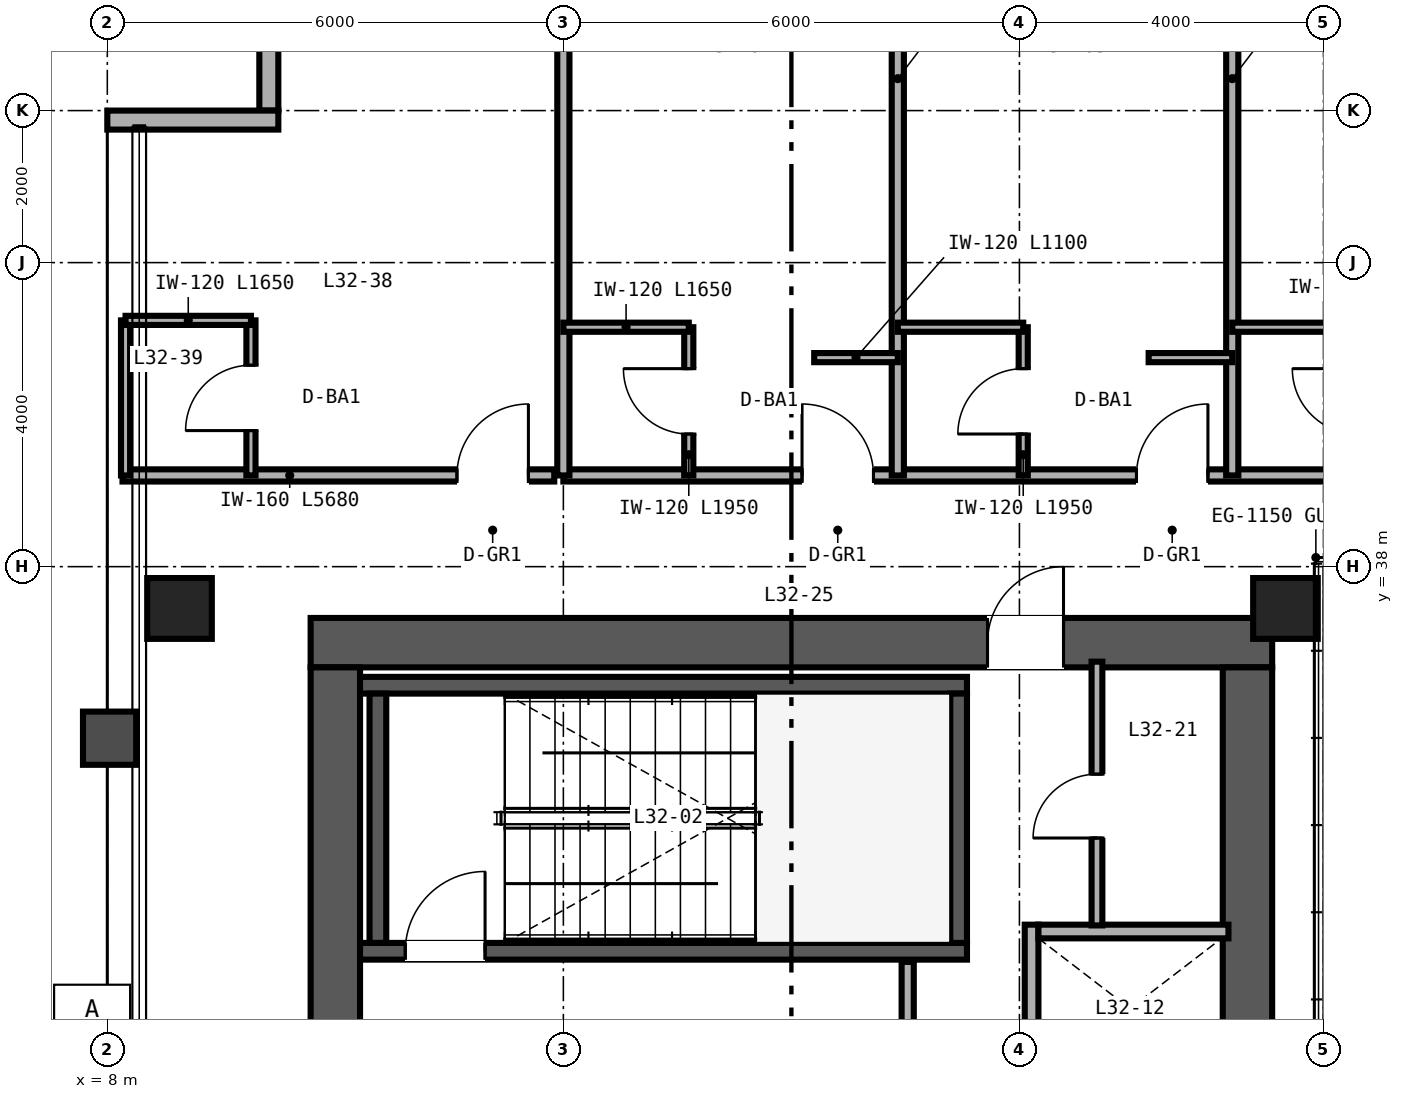
"""IFC4 building model, lengths in metres.
Left out: names, types, materials, properties, quantities, classifications, styles, units other than length and angle.
Written with IfcOpenShell. Run it as: python <this file> out.ifc"""

import sys

from ifc_helpers import new_model, si_unit, direction, frame, frame_2d, origin, origin_2d, place, context, subcontext, project, spatial, rectangle, hollow_rectangle, extrude, source, transform, mapped, element, fill, save


model = new_model("IFC4")
c1 = context("Model", 3, precision=1e-05, world=origin(), true_north=direction((0.0, 1.0)))
c2 = subcontext(c1, "Body", "Model", "MODEL_VIEW")
j1 = project(units=[si_unit("LENGTHUNIT", "METRE"), si_unit("PLANEANGLEUNIT", "RADIAN")], contexts=[c1])
p1 = place(None, origin())
s1 = spatial("IfcSite", under=j1, at=p1, CompositionType="ELEMENT")
p2 = place(p1, origin())
s2 = spatial("IfcBuilding", under=s1, at=p2, CompositionType="ELEMENT")
p3 = place(p2, frame((0.0, 0.0, 129.6)))
s3 = spatial("IfcBuildingStorey", under=s2, at=p3, CompositionType="ELEMENT", Elevation=129.6)
p4 = place(p3, frame((10.675, 37.0, 0.0), z_axis=(0.0, 0.0, 1.0), x_axis=(1.0, 0.0, 0.0)))
e1 = element("IfcWall", 1, at=p4, inside=s3, PredefinedType="SHEAR", context=c2, shape_type="SweptSolid", body=[
    extrude(rectangle(XDim=12.65, YDim=0.65, at=frame_2d((6.325, 0.0))), origin(), (0.0, 0.0, 1.0), 3.36),
])
p5 = place(p4, frame((8.905, 0.0, 0.0)))
e2 = element("IfcOpeningElement", 2, at=p5, cuts=e1, PredefinedType="OPENING", context=c2, shape_type="SweptSolid", body=[
    extrude(rectangle(XDim=1.0, YDim=2.15, at=frame_2d((0.5, 1.075))), frame((0.0, 0.335, 0.0), z_axis=(0.0, -1.0, 0.0), x_axis=(1.0, 0.0, 0.0)), (0.0, 0.0, 1.0), 0.67),
])
for number, where, z_axis, x_axis in (
    (3, (11.0, 15.325, 0.0), (0.0, 0.0, 1.0), (0.0, 1.0, 0.0)),
    (4, (23.0, 15.325, 0.0), (0.0, 0.0, 1.0), (0.0, 1.0, 0.0)),
):
    element("IfcWall", number, at=place(p3, frame(where, z_axis=z_axis, x_axis=x_axis)), inside=s3, PredefinedType="SHEAR", context=c2, shape_type="SweptSolid", body=[
        extrude(rectangle(XDim=21.35, YDim=0.65, at=frame_2d((10.675, 0.0))), origin(), (0.0, 0.0, 1.0), 3.36),
    ])
p6 = place(p3, frame((11.325, 32.94, 0.0), z_axis=(0.0, 0.0, 1.0), x_axis=(1.0, 0.0, 0.0)))
e5 = element("IfcWall", 5, at=p6, inside=s3, PredefinedType="SHEAR", context=c2, shape_type="SweptSolid", body=[
    extrude(rectangle(XDim=7.985, YDim=0.22, at=frame_2d((3.993, 0.0))), origin(), (0.0, 0.0, 1.0), 3.4),
])
p7 = place(p6, frame((0.595, 0.0, 0.0)))
e6 = element("IfcOpeningElement", 6, at=p7, cuts=e5, PredefinedType="OPENING", context=c2, shape_type="SweptSolid", body=[
    extrude(rectangle(XDim=1.05, YDim=2.15, at=frame_2d((0.525, 1.075))), frame((0.0, 0.12, 0.0), z_axis=(0.0, -1.0, 0.0), x_axis=(1.0, 0.0, 0.0)), (0.0, 0.0, 1.0), 0.24),
])
p8 = place(p3, frame((11.325, 36.44, 0.0), z_axis=(0.0, 0.0, 1.0), x_axis=(1.0, 0.0, 0.0)))
e7 = element("IfcWall", 7, at=p8, inside=s3, PredefinedType="SHEAR", context=c2, shape_type="SweptSolid", body=[
    extrude(rectangle(XDim=7.985, YDim=0.22, at=frame_2d((3.993, 0.0))), origin(), (0.0, 0.0, 1.0), 3.4),
])
for number, where, z_axis, x_axis in (
    (8, (11.56, 33.05, 0.0), (0.0, 0.0, 1.0), (0.0, 1.0, 0.0)),
    (9, (19.2, 33.05, 0.0), (0.0, 0.0, 1.0), (0.0, 1.0, 0.0)),
):
    element("IfcWall", number, at=place(p3, frame(where, z_axis=z_axis, x_axis=x_axis)), inside=s3, PredefinedType="SHEAR", context=c2, shape_type="SweptSolid", body=[
        extrude(rectangle(XDim=3.28, YDim=0.22, at=frame_2d((1.64, 0.0))), origin(), (0.0, 0.0, 1.0), 3.4),
    ])
m1 = source(origin(), c2, "Body", "SweptSolid", [
    extrude(hollow_rectangle(XDim=0.85, YDim=0.8, WallThickness=0.032, at=origin_2d()), origin(), (0.0, 0.0, 1.0), 3.36),
])
for number, where, z_axis, x_axis in (
    (10, (8.95, 37.45, 0.0), (0.0, 0.0, 1.0), (1.0, 0.0, 0.0)),
    (11, (23.5, 37.45, 0.0), (0.0, 0.0, 1.0), (1.0, 0.0, 0.0)),
):
    element("IfcColumn", number, at=place(p3, frame(where, z_axis=z_axis, x_axis=x_axis)), inside=s3, PredefinedType="COLUMN", context=c2, shape_type="MappedRepresentation", body=[
        mapped(m1, transform((0.0, 0.0, 0.0), scale=1.0)),
    ])
p9 = place(p3, frame((10.125, 46.0, 0.0), z_axis=(0.0, 0.0, 1.0), x_axis=(0.0, -1.0, 0.0)))
e12 = element("IfcWall", 12, at=p9, inside=s3, PredefinedType="SOLIDWALL", context=c2, shape_type="SweptSolid", body=[
    extrude(rectangle(XDim=2.0, YDim=0.25, at=frame_2d((1.0, 0.0))), origin(), (0.0, 0.0, 1.0), 3.36),
])
p10 = place(p3, frame((10.25, 43.875, 0.0), z_axis=(0.0, 0.0, 1.0), x_axis=(-1.0, 0.0, 0.0)))
e13 = element("IfcWall", 13, at=p10, inside=s3, PredefinedType="SOLIDWALL", context=c2, shape_type="SweptSolid", body=[
    extrude(rectangle(XDim=2.25, YDim=0.25, at=frame_2d((1.125, 0.0))), origin(), (0.0, 0.0, 1.0), 3.36),
])
p11 = place(p3, frame((20.16, 29.0, 0.0), z_axis=(0.0, 0.0, 1.0), x_axis=(0.0, 1.0, 0.0)))
e14 = element("IfcWall", 14, at=p11, inside=s3, PredefinedType="SOLIDWALL", context=c2, shape_type="SweptSolid", body=[
    extrude(rectangle(XDim=4.29, YDim=0.18, at=frame_2d((2.145, 0.0))), origin(), (0.0, 0.0, 1.0), 3.36),
])
p12 = place(p3, frame((20.25, 33.2, 0.0), z_axis=(0.0, 0.0, 1.0), x_axis=(1.0, 0.0, 0.0)))
e15 = element("IfcWall", 15, at=p12, inside=s3, PredefinedType="SOLIDWALL", context=c2, shape_type="SweptSolid", body=[
    extrude(rectangle(XDim=2.5, YDim=0.18, at=frame_2d((1.25, 0.0))), origin(), (0.0, 0.0, 1.0), 3.36),
])
p13 = place(p3, frame((18.53, 28.9, 0.0), z_axis=(0.0, 0.0, 1.0), x_axis=(0.0, 1.0, 0.0)))
e16 = element("IfcWall", 16, at=p13, inside=s3, PredefinedType="PARTITIONING", context=c2, shape_type="SweptSolid", body=[
    extrude(rectangle(XDim=3.9, YDim=0.16, at=frame_2d((1.95, 0.0))), origin(), (0.0, 0.0, 1.0), 3.36),
])
p14 = place(p13, frame((1.5, 0.0, 0.0)))
e17 = element("IfcOpeningElement", 17, at=p14, cuts=e16, PredefinedType="OPENING", context=c2, shape_type="SweptSolid", body=[
    extrude(rectangle(XDim=1.0, YDim=2.15, at=frame_2d((0.5, 1.075))), frame((0.0, 0.09, 0.0), z_axis=(0.0, -1.0, 0.0), x_axis=(1.0, 0.0, 0.0)), (0.0, 0.0, 1.0), 0.18),
])
p15 = place(p3, frame((21.02, 33.28, 0.0), z_axis=(0.0, 0.0, 1.0), x_axis=(0.0, 1.0, 0.0)))
e18 = element("IfcWall", 18, at=p15, inside=s3, PredefinedType="PARTITIONING", context=c2, shape_type="SweptSolid", body=[
    extrude(rectangle(XDim=3.47, YDim=0.142, at=frame_2d((1.735, 0.0))), origin(), (0.0, 0.0, 1.0), 3.36),
])
p16 = place(p15, frame((1.15, 0.0, 0.0)))
e19 = element("IfcOpeningElement", 19, at=p16, cuts=e18, PredefinedType="OPENING", context=c2, shape_type="SweptSolid", body=[
    extrude(rectangle(XDim=0.84, YDim=2.1, at=frame_2d((0.42, 1.05))), frame((0.0, 0.081, 0.0), z_axis=(0.0, -1.0, 0.0), x_axis=(1.0, 0.0, 0.0)), (0.0, 0.0, 1.0), 0.162),
])
p17 = place(p3, frame((8.2, 39.2, 0.0), z_axis=(0.0, 0.0, 1.0), x_axis=(1.0, 0.0, 0.0)))
e20 = element("IfcWall", 20, at=p17, inside=s3, PredefinedType="PARTITIONING", context=c2, shape_type="SweptSolid", body=[
    extrude(rectangle(XDim=5.68, YDim=0.16, at=frame_2d((2.84, 0.0))), origin(), (0.0, 0.0, 1.0), 3.36),
])
p18 = place(p17, frame((4.4, 0.0, 0.0)))
e21 = element("IfcOpeningElement", 21, at=p18, cuts=e20, PredefinedType="OPENING", context=c2, shape_type="SweptSolid", body=[
    extrude(rectangle(XDim=0.94, YDim=2.15, at=frame_2d((0.47, 1.075))), frame((0.0, 0.09, 0.0), z_axis=(0.0, -1.0, 0.0), x_axis=(1.0, 0.0, 0.0)), (0.0, 0.0, 1.0), 0.18),
])
p19 = place(p3, frame((9.89, 39.2, 0.0), z_axis=(0.0, 0.0, 1.0), x_axis=(0.0, 1.0, 0.0)))
e22 = element("IfcWall", 22, at=p19, inside=s3, PredefinedType="PARTITIONING", context=c2, shape_type="SweptSolid", body=[
    extrude(rectangle(XDim=2.04, YDim=0.12, at=frame_2d((1.02, 0.0))), origin(), (0.0, 0.0, 1.0), 3.36),
])
p20 = place(p19, frame((0.59, 0.0, 0.0)))
e23 = element("IfcOpeningElement", 23, at=p20, cuts=e22, PredefinedType="OPENING", context=c2, shape_type="SweptSolid", body=[
    extrude(rectangle(XDim=0.86, YDim=2.1, at=frame_2d((0.43, 1.05))), frame((0.0, 0.07, 0.0), z_axis=(0.0, -1.0, 0.0), x_axis=(1.0, 0.0, 0.0)), (0.0, 0.0, 1.0), 0.14),
])
p21 = place(p3, frame((8.24, 39.2, 0.0), z_axis=(0.0, 0.0, 1.0), x_axis=(0.0, 1.0, 0.0)))
e24 = element("IfcWall", 24, at=p21, inside=s3, PredefinedType="PARTITIONING", context=c2, shape_type="SweptSolid", body=[
    extrude(rectangle(XDim=2.04, YDim=0.12, at=frame_2d((1.02, 0.0))), origin(), (0.0, 0.0, 1.0), 3.36),
])
p22 = place(p3, frame((8.24, 41.24, 0.0), z_axis=(0.0, 0.0, 1.0), x_axis=(1.0, 0.0, 0.0)))
e25 = element("IfcWall", 25, at=p22, inside=s3, PredefinedType="PARTITIONING", context=c2, shape_type="SweptSolid", body=[
    extrude(rectangle(XDim=1.65, YDim=0.12, at=frame_2d((0.825, 0.0))), origin(), (0.0, 0.0, 1.0), 3.36),
])
p23 = place(p3, frame((14.0, 39.2, 0.0), z_axis=(0.0, 0.0, 1.0), x_axis=(1.0, 0.0, 0.0)))
e26 = element("IfcWall", 26, at=p23, inside=s3, PredefinedType="PARTITIONING", context=c2, shape_type="SweptSolid", body=[
    extrude(rectangle(XDim=36.0, YDim=0.16, at=frame_2d((18.0, 0.0))), origin(), (0.0, 0.0, 1.0), 2.581),
])
p24 = place(p23, frame((3.14, 0.0, 0.0)))
e27 = element("IfcOpeningElement", 27, at=p24, cuts=e26, PredefinedType="OPENING", context=c2, shape_type="SweptSolid", body=[
    extrude(rectangle(XDim=0.94, YDim=2.15, at=frame_2d((0.47, 1.075))), frame((0.0, 0.09, 0.0), z_axis=(0.0, -1.0, 0.0), x_axis=(1.0, 0.0, 0.0)), (0.0, 0.0, 1.0), 0.18),
])
p25 = place(p23, frame((7.54, 0.0, 0.0)))
e28 = element("IfcOpeningElement", 28, at=p25, cuts=e26, PredefinedType="OPENING", context=c2, shape_type="SweptSolid", body=[
    extrude(rectangle(XDim=0.94, YDim=2.15, at=frame_2d((0.47, 1.075))), frame((0.0, 0.09, 0.0), z_axis=(0.0, -1.0, 0.0), x_axis=(1.0, 0.0, 0.0)), (0.0, 0.0, 1.0), 0.18),
])
p26 = place(p23, frame((11.94, 0.0, 0.0)))
e29 = element("IfcOpeningElement", 29, at=p26, cuts=e26, PredefinedType="OPENING", context=c2, shape_type="SweptSolid", body=[
    extrude(rectangle(XDim=0.94, YDim=2.15, at=frame_2d((0.47, 1.075))), frame((0.0, 0.09, 0.0), z_axis=(0.0, -1.0, 0.0), x_axis=(1.0, 0.0, 0.0)), (0.0, 0.0, 1.0), 0.18),
])
p27 = place(p23, frame((15.02, 0.0, 0.0)))
e30 = element("IfcOpeningElement", 30, at=p27, cuts=e26, PredefinedType="OPENING", context=c2, shape_type="SweptSolid", body=[
    extrude(rectangle(XDim=0.96, YDim=2.15, at=frame_2d((0.48, 1.075))), frame((0.0, 0.09, 0.0), z_axis=(0.0, -1.0, 0.0), x_axis=(1.0, 0.0, 0.0)), (0.0, 0.0, 1.0), 0.18),
])
p28 = place(p23, frame((21.14, 0.0, 0.0)))
e31 = element("IfcOpeningElement", 31, at=p28, cuts=e26, PredefinedType="OPENING", context=c2, shape_type="SweptSolid", body=[
    extrude(rectangle(XDim=0.94, YDim=2.15, at=frame_2d((0.47, 1.075))), frame((0.0, 0.09, 0.0), z_axis=(0.0, -1.0, 0.0), x_axis=(1.0, 0.0, 0.0)), (0.0, 0.0, 1.0), 0.18),
])
p29 = place(p23, frame((24.79, 0.0, 0.0)))
e32 = element("IfcOpeningElement", 32, at=p29, cuts=e26, PredefinedType="OPENING", context=c2, shape_type="SweptSolid", body=[
    extrude(rectangle(XDim=0.94, YDim=2.15, at=frame_2d((0.47, 1.075))), frame((0.0, 0.09, 0.0), z_axis=(0.0, -1.0, 0.0), x_axis=(1.0, 0.0, 0.0)), (0.0, 0.0, 1.0), 0.18),
])
p30 = place(p23, frame((30.24, 0.0, 0.0)))
e33 = element("IfcOpeningElement", 33, at=p30, cuts=e26, PredefinedType="OPENING", context=c2, shape_type="SweptSolid", body=[
    extrude(rectangle(XDim=0.94, YDim=2.15, at=frame_2d((0.47, 1.075))), frame((0.0, 0.09, 0.0), z_axis=(0.0, -1.0, 0.0), x_axis=(1.0, 0.0, 0.0)), (0.0, 0.0, 1.0), 0.18),
])
p31 = place(p23, frame((34.74, 0.0, 0.0)))
e34 = element("IfcOpeningElement", 34, at=p31, cuts=e26, PredefinedType="OPENING", context=c2, shape_type="SweptSolid", body=[
    extrude(rectangle(XDim=0.94, YDim=2.15, at=frame_2d((0.47, 1.075))), frame((0.0, 0.09, 0.0), z_axis=(0.0, -1.0, 0.0), x_axis=(1.0, 0.0, 0.0)), (0.0, 0.0, 1.0), 0.18),
])
for number, where, z_axis, x_axis in (
    (35, (14.0, 39.2, 0.0), (0.0, 0.0, 1.0), (0.0, 1.0, 0.0)),
    (36, (18.4, 39.2, 0.0), (0.0, 0.0, 1.0), (0.0, 1.0, 0.0)),
):
    element("IfcWall", number, at=place(p3, frame(where, z_axis=z_axis, x_axis=x_axis)), inside=s3, PredefinedType="PARTITIONING", context=c2, shape_type="SweptSolid", body=[
        extrude(rectangle(XDim=10.44, YDim=0.16, at=frame_2d((5.22, 0.0))), origin(), (0.0, 0.0, 1.0), 2.667),
    ])
p32 = place(p3, frame((15.65, 39.2, 0.0), z_axis=(0.0, 0.0, 1.0), x_axis=(0.0, 1.0, 0.0)))
e37 = element("IfcWall", 37, at=p32, inside=s3, PredefinedType="PARTITIONING", context=c2, shape_type="SweptSolid", body=[
    extrude(rectangle(XDim=1.95, YDim=0.12, at=frame_2d((0.975, 0.0))), origin(), (0.0, 0.0, 1.0), 3.36),
])
p33 = place(p32, frame((0.545, 0.0, 0.0)))
e38 = element("IfcOpeningElement", 38, at=p33, cuts=e37, PredefinedType="OPENING", context=c2, shape_type="SweptSolid", body=[
    extrude(rectangle(XDim=0.86, YDim=2.1, at=frame_2d((0.43, 1.05))), frame((0.0, 0.07, 0.0), z_axis=(0.0, -1.0, 0.0), x_axis=(1.0, 0.0, 0.0)), (0.0, 0.0, 1.0), 0.14),
])
p34 = place(p3, frame((14.0, 41.15, 0.0), z_axis=(0.0, 0.0, 1.0), x_axis=(1.0, 0.0, 0.0)))
e39 = element("IfcWall", 39, at=p34, inside=s3, PredefinedType="PARTITIONING", context=c2, shape_type="SweptSolid", body=[
    extrude(rectangle(XDim=1.65, YDim=0.12, at=frame_2d((0.825, 0.0))), origin(), (0.0, 0.0, 1.0), 3.36),
])
p35 = place(p3, frame((17.3, 40.75, 0.0), z_axis=(0.0, 0.0, 1.0), x_axis=(1.0, 0.0, 0.0)))
e40 = element("IfcWall", 40, at=p35, inside=s3, PredefinedType="PARTITIONING", context=c2, shape_type="SweptSolid", body=[
    extrude(rectangle(XDim=1.1, YDim=0.12, at=frame_2d((0.55, 0.0))), origin(), (0.0, 0.0, 1.0), 3.36),
])
p36 = place(p3, frame((22.8, 39.2, 0.0), z_axis=(0.0, 0.0, 1.0), x_axis=(0.0, 1.0, 0.0)))
e41 = element("IfcWall", 41, at=p36, inside=s3, PredefinedType="PARTITIONING", context=c2, shape_type="SweptSolid", body=[
    extrude(rectangle(XDim=10.44, YDim=0.16, at=frame_2d((5.22, 0.0))), origin(), (0.0, 0.0, 1.0), 2.823),
])
p37 = place(p3, frame((20.05, 39.2, 0.0), z_axis=(0.0, 0.0, 1.0), x_axis=(0.0, 1.0, 0.0)))
e42 = element("IfcWall", 42, at=p37, inside=s3, PredefinedType="PARTITIONING", context=c2, shape_type="SweptSolid", body=[
    extrude(rectangle(XDim=1.95, YDim=0.12, at=frame_2d((0.975, 0.0))), origin(), (0.0, 0.0, 1.0), 3.36),
])
p38 = place(p37, frame((0.545, 0.0, 0.0)))
e43 = element("IfcOpeningElement", 43, at=p38, cuts=e42, PredefinedType="OPENING", context=c2, shape_type="SweptSolid", body=[
    extrude(rectangle(XDim=0.86, YDim=2.1, at=frame_2d((0.43, 1.05))), frame((0.0, 0.07, 0.0), z_axis=(0.0, -1.0, 0.0), x_axis=(1.0, 0.0, 0.0)), (0.0, 0.0, 1.0), 0.14),
])
p39 = place(p3, frame((18.4, 41.15, 0.0), z_axis=(0.0, 0.0, 1.0), x_axis=(1.0, 0.0, 0.0)))
e44 = element("IfcWall", 44, at=p39, inside=s3, PredefinedType="PARTITIONING", context=c2, shape_type="SweptSolid", body=[
    extrude(rectangle(XDim=1.65, YDim=0.12, at=frame_2d((0.825, 0.0))), origin(), (0.0, 0.0, 1.0), 3.36),
])
p40 = place(p3, frame((21.7, 40.75, 0.0), z_axis=(0.0, 0.0, 1.0), x_axis=(1.0, 0.0, 0.0)))
e45 = element("IfcWall", 45, at=p40, inside=s3, PredefinedType="PARTITIONING", context=c2, shape_type="SweptSolid", body=[
    extrude(rectangle(XDim=1.1, YDim=0.12, at=frame_2d((0.55, 0.0))), origin(), (0.0, 0.0, 1.0), 3.36),
])
p41 = place(p3, frame((22.8, 41.15, 0.0), z_axis=(0.0, 0.0, 1.0), x_axis=(1.0, 0.0, 0.0)))
e46 = element("IfcWall", 46, at=p41, inside=s3, PredefinedType="PARTITIONING", context=c2, shape_type="SweptSolid", body=[
    extrude(rectangle(XDim=1.65, YDim=0.12, at=frame_2d((0.825, 0.0))), origin(), (0.0, 0.0, 1.0), 2.581),
])
m2 = source(origin(), c2, "Body", "SweptSolid", [
    extrude(rectangle(XDim=1.05, YDim=2.15, at=frame_2d((0.525, 1.075))), frame((0.0, 0.025, 0.0), z_axis=(0.0, -1.0, 0.0), x_axis=(1.0, 0.0, 0.0)), (0.0, 0.0, 1.0), 0.05),
])
p42 = place(p7, origin())
e47 = element("IfcDoor", 47, at=p42, inside=s3, OperationType="SINGLE_SWING_RIGHT", PredefinedType="DOOR", context=c2, shape_type="MappedRepresentation", body=[
    mapped(m2, transform((0.0, 0.0, 0.0), scale=1.0)),
])
fill(e6, e47)
m3 = source(origin(), c2, "Body", "SweptSolid", [
    extrude(rectangle(XDim=0.84, YDim=2.1, at=frame_2d((0.42, 1.05))), frame((0.0, 0.025, 0.0), z_axis=(0.0, -1.0, 0.0), x_axis=(1.0, 0.0, 0.0)), (0.0, 0.0, 1.0), 0.05),
])
p43 = place(p16, origin())
e48 = element("IfcDoor", 48, at=p43, inside=s3, OperationType="SINGLE_SWING_LEFT", PredefinedType="DOOR", context=c2, shape_type="MappedRepresentation", body=[
    mapped(m3, transform((0.0, 0.0, 0.0), scale=1.0)),
])
fill(e19, e48)
m4 = source(origin(), c2, "Body", "SweptSolid", [
    extrude(rectangle(XDim=1.0, YDim=2.15, at=frame_2d((0.5, 1.075))), frame((0.0, 0.025, 0.0), z_axis=(0.0, -1.0, 0.0), x_axis=(1.0, 0.0, 0.0)), (0.0, 0.0, 1.0), 0.05),
])
p44 = place(p5, origin())
e49 = element("IfcDoor", 49, at=p44, inside=s3, OperationType="SINGLE_SWING_RIGHT", PredefinedType="DOOR", context=c2, shape_type="MappedRepresentation", body=[
    mapped(m4, transform((0.0, 0.0, 0.0), scale=1.0)),
])
fill(e2, e49)
m5 = source(origin(), c2, "Body", "SweptSolid", [
    extrude(rectangle(XDim=0.86, YDim=2.1, at=frame_2d((0.43, 1.05))), frame((0.0, 0.025, 0.0), z_axis=(0.0, -1.0, 0.0), x_axis=(1.0, 0.0, 0.0)), (0.0, 0.0, 1.0), 0.05),
])
p45 = place(p20, origin())
e50 = element("IfcDoor", 50, at=p45, inside=s3, OperationType="SINGLE_SWING_LEFT", PredefinedType="DOOR", context=c2, shape_type="MappedRepresentation", body=[
    mapped(m5, transform((0.0, 0.0, 0.0), scale=1.0)),
])
fill(e23, e50)
m6 = source(origin(), c2, "Body", "SweptSolid", [
    extrude(rectangle(XDim=0.94, YDim=2.15, at=frame_2d((0.47, 1.075))), frame((0.0, 0.025, 0.0), z_axis=(0.0, -1.0, 0.0), x_axis=(1.0, 0.0, 0.0)), (0.0, 0.0, 1.0), 0.05),
])
p46 = place(p18, origin())
e51 = element("IfcDoor", 51, at=p46, inside=s3, OperationType="SINGLE_SWING_RIGHT", PredefinedType="DOOR", context=c2, shape_type="MappedRepresentation", body=[
    mapped(m6, transform((0.0, 0.0, 0.0), scale=1.0)),
])
fill(e21, e51)
p47 = place(p33, origin())
e52 = element("IfcDoor", 52, at=p47, inside=s3, OperationType="SINGLE_SWING_RIGHT", PredefinedType="DOOR", context=c2, shape_type="MappedRepresentation", body=[
    mapped(m5, transform((0.0, 0.0, 0.0), scale=1.0)),
])
fill(e38, e52)
p48 = place(p38, origin())
e53 = element("IfcDoor", 53, at=p48, inside=s3, OperationType="SINGLE_SWING_LEFT", PredefinedType="DOOR", context=c2, shape_type="MappedRepresentation", body=[
    mapped(m5, transform((0.0, 0.0, 0.0), scale=1.0)),
])
fill(e43, e53)
p49 = place(p24, origin())
e54 = element("IfcDoor", 54, at=p49, inside=s3, OperationType="SINGLE_SWING_LEFT", PredefinedType="DOOR", context=c2, shape_type="MappedRepresentation", body=[
    mapped(m6, transform((0.0, 0.0, 0.0), scale=1.0)),
])
fill(e27, e54)
p50 = place(p25, origin())
e55 = element("IfcDoor", 55, at=p50, inside=s3, OperationType="SINGLE_SWING_RIGHT", PredefinedType="DOOR", context=c2, shape_type="MappedRepresentation", body=[
    mapped(m6, transform((0.0, 0.0, 0.0), scale=1.0)),
])
fill(e28, e55)
save(model, sys.argv[1])
